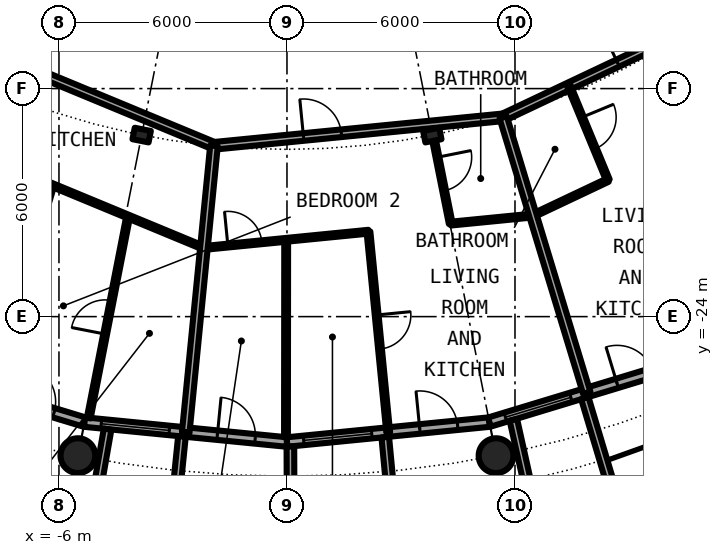
"""IFC4 building model, lengths in metres.
Left out: names, types, materials, properties, quantities, classifications, styles, units other than length and angle.
Written with IfcOpenShell. Run it as: python <this file> out.ifc"""

import sys

from ifc_helpers import new_model, si_unit, direction, frame, frame_2d, origin, origin_2d, place, context, subcontext, project, spatial, rectangle, hollow_circle, i_section, extrude, element, fill, save


model = new_model("IFC4")
c1 = context("Model", 3, precision=1e-05, world=origin(), true_north=direction((0.0, 1.0)))
c2 = subcontext(c1, "Body", "Model", "MODEL_VIEW")
j1 = project(units=[si_unit("LENGTHUNIT", "METRE"), si_unit("PLANEANGLEUNIT", "RADIAN")], contexts=[c1])
p1 = place(None, origin())
s1 = spatial("IfcSite", under=j1, at=p1, CompositionType="ELEMENT")
p2 = place(p1, origin())
s2 = spatial("IfcBuilding", under=s1, at=p2, CompositionType="ELEMENT")
p3 = place(p2, frame((0.0, 0.0, 117.75)))
s3 = spatial("IfcBuildingStorey", under=s2, at=p3, CompositionType="ELEMENT", Elevation=117.75)
for number, where, z_axis, x_axis in (
    (1, (-5.501, -27.658, 0.0), (0.0, 0.0, 1.0), (1.0, 0.0, 0.0)),
    (2, (5.501, -27.658, 0.0), (0.0, 0.0, 1.0), (1.0, 0.0, 0.0)),
):
    element("IfcColumn", number, at=place(p3, frame(where, z_axis=z_axis, x_axis=x_axis)), inside=s3, PredefinedType="COLUMN", context=c2, shape_type="SweptSolid", body=[
        extrude(hollow_circle(Radius=0.457, WallThickness=0.04, at=origin_2d()), origin(), (0.0, 0.0, 1.0), 3.05),
    ])
for number, where, z_axis, x_axis in (
    (3, (-3.824, -19.223, 0.0), (0.0, 0.0, 1.0), (-0.195, -0.981, 0.0)),
    (4, (3.824, -19.223, 0.0), (0.0, 0.0, 1.0), (0.195, -0.981, 0.0)),
):
    element("IfcColumn", number, at=place(p3, frame(where, z_axis=z_axis, x_axis=x_axis)), inside=s3, PredefinedType="COLUMN", context=c2, shape_type="SweptSolid", body=[
        extrude(i_section(OverallWidth=0.307, OverallDepth=0.432, WebThickness=0.021, FlangeThickness=0.04, FilletRadius=0.027, at=origin_2d()), origin(), (0.0, 0.0, 1.0), 3.05),
    ])
p4 = place(p3, frame((-10.447, -25.222, 0.0), z_axis=(0.0, 0.0, 1.0), x_axis=(0.956965678721, -0.290201119486, 0.0)))
e5 = element("IfcWall", 5, at=p4, inside=s3, PredefinedType="SOLIDWALL", context=c2, shape_type="SweptSolid", body=[
    extrude(rectangle(XDim=5.351, YDim=0.25, at=frame_2d((2.676, 0.0))), origin(), (0.0, 0.0, 1.0), 2.7),
])
p5 = place(p4, frame((0.441, 0.0, 0.3)))
e6 = element("IfcOpeningElement", 6, at=p5, cuts=e5, PredefinedType="OPENING", context=c2, shape_type="SweptSolid", body=[
    extrude(rectangle(XDim=1.8, YDim=2.1, at=frame_2d((0.9, 1.05))), frame((0.0, 0.135, 0.0), z_axis=(0.0, -1.0, 0.0), x_axis=(1.0, 0.0, 0.0)), (0.0, 0.0, 1.0), 0.27),
])
p6 = place(p4, frame((3.51, 0.0, 0.0)))
e7 = element("IfcOpeningElement", 7, at=p6, cuts=e5, PredefinedType="OPENING", context=c2, shape_type="SweptSolid", body=[
    extrude(rectangle(XDim=1.0, YDim=2.2, at=frame_2d((0.5, 1.1))), frame((0.0, 0.135, 0.0), z_axis=(0.0, -1.0, 0.0), x_axis=(1.0, 0.0, 0.0)), (0.0, 0.0, 1.0), 0.27),
])
p7 = place(p3, frame((-5.326, -26.775, 0.0), z_axis=(0.0, 0.0, 1.0), x_axis=(0.995173996315, -0.098126026407, 0.0)))
e8 = element("IfcWall", 8, at=p7, inside=s3, PredefinedType="SOLIDWALL", context=c2, shape_type="SweptSolid", body=[
    extrude(rectangle(XDim=5.352, YDim=0.25, at=frame_2d((2.676, 0.0))), origin(), (0.0, 0.0, 1.0), 2.7),
])
p8 = place(p7, frame((0.441, 0.0, 0.3)))
e9 = element("IfcOpeningElement", 9, at=p8, cuts=e8, PredefinedType="OPENING", context=c2, shape_type="SweptSolid", body=[
    extrude(rectangle(XDim=1.8, YDim=2.1, at=frame_2d((0.9, 1.05))), frame((0.0, 0.135, 0.0), z_axis=(0.0, -1.0, 0.0), x_axis=(1.0, 0.0, 0.0)), (0.0, 0.0, 1.0), 0.27),
])
p9 = place(p7, frame((3.51, 0.0, 0.0)))
e10 = element("IfcOpeningElement", 10, at=p9, cuts=e8, PredefinedType="OPENING", context=c2, shape_type="SweptSolid", body=[
    extrude(rectangle(XDim=1.0, YDim=2.2, at=frame_2d((0.5, 1.1))), frame((0.0, 0.135, 0.0), z_axis=(0.0, -1.0, 0.0), x_axis=(1.0, 0.0, 0.0)), (0.0, 0.0, 1.0), 0.27),
])
p10 = place(p3, frame((-4.72, -26.961, -0.03), z_axis=(0.0, 0.0, 1.0), x_axis=(-0.172463232037, -0.98501595601, 0.0)))
e11 = element("IfcWall", 11, at=p10, inside=s3, PredefinedType="SOLIDWALL", context=c2, shape_type="SweptSolid", body=[
    extrude(rectangle(XDim=2.929, YDim=0.2, at=frame_2d((1.464, 0.0))), origin(), (0.0, 0.0, 1.0), 2.73),
])
p11 = place(p3, frame((-2.764, -27.153, -0.03), z_axis=(0.0, 0.0, 1.0), x_axis=(-0.101505487237, -0.994834979311, 0.0)))
e12 = element("IfcWall", 12, at=p11, inside=s3, PredefinedType="SOLIDWALL", context=c2, shape_type="SweptSolid", body=[
    extrude(rectangle(XDim=3.007, YDim=0.2, at=frame_2d((1.503, 0.0))), origin(), (0.0, 0.0, 1.0), 2.73),
])
p12 = place(p3, frame((0.0, -27.3, 0.0), z_axis=(0.0, 0.0, 1.0), x_axis=(0.995173996315, 0.098126026407, 0.0)))
e13 = element("IfcWall", 13, at=p12, inside=s3, PredefinedType="SOLIDWALL", context=c2, shape_type="SweptSolid", body=[
    extrude(rectangle(XDim=5.352, YDim=0.25, at=frame_2d((2.676, 0.0))), origin(), (0.0, 0.0, 1.0), 2.7),
])
p13 = place(p12, frame((0.441, 0.0, 0.3)))
e14 = element("IfcOpeningElement", 14, at=p13, cuts=e13, PredefinedType="OPENING", context=c2, shape_type="SweptSolid", body=[
    extrude(rectangle(XDim=1.8, YDim=2.1, at=frame_2d((0.9, 1.05))), frame((0.0, 0.135, 0.0), z_axis=(0.0, -1.0, 0.0), x_axis=(1.0, 0.0, 0.0)), (0.0, 0.0, 1.0), 0.27),
])
p14 = place(p12, frame((3.51, 0.0, 0.0)))
e15 = element("IfcOpeningElement", 15, at=p14, cuts=e13, PredefinedType="OPENING", context=c2, shape_type="SweptSolid", body=[
    extrude(rectangle(XDim=1.0, YDim=2.2, at=frame_2d((0.5, 1.1))), frame((0.0, 0.135, 0.0), z_axis=(0.0, -1.0, 0.0), x_axis=(1.0, 0.0, 0.0)), (0.0, 0.0, 1.0), 0.27),
])
p15 = place(p3, frame((0.09, -27.417, -0.03), z_axis=(0.0, 0.0, 1.0), x_axis=(0.00347308367, -0.999993968827, 0.0)))
e16 = element("IfcWall", 16, at=p15, inside=s3, PredefinedType="SOLIDWALL", context=c2, shape_type="SweptSolid", body=[
    extrude(rectangle(XDim=2.882, YDim=0.2, at=frame_2d((1.441, 0.0))), origin(), (0.0, 0.0, 1.0), 2.73),
])
p16 = place(p3, frame((2.586, -27.171, -0.03), z_axis=(0.0, 0.0, 1.0), x_axis=(0.094548432284, -0.995520262954, 0.0)))
e17 = element("IfcWall", 17, at=p16, inside=s3, PredefinedType="SOLIDWALL", context=c2, shape_type="SweptSolid", body=[
    extrude(rectangle(XDim=3.006, YDim=0.2, at=frame_2d((1.503, 0.0))), origin(), (0.0, 0.0, 1.0), 2.73),
])
p17 = place(p3, frame((5.326, -26.775, 0.0), z_axis=(0.0, 0.0, 1.0), x_axis=(0.956965678721, 0.290201119486, 0.0)))
e18 = element("IfcWall", 18, at=p17, inside=s3, PredefinedType="SOLIDWALL", context=c2, shape_type="SweptSolid", body=[
    extrude(rectangle(XDim=5.351, YDim=0.25, at=frame_2d((2.676, 0.0))), origin(), (0.0, 0.0, 1.0), 2.7),
])
p18 = place(p17, frame((0.441, 0.0, 0.3)))
e19 = element("IfcOpeningElement", 19, at=p18, cuts=e18, PredefinedType="OPENING", context=c2, shape_type="SweptSolid", body=[
    extrude(rectangle(XDim=1.8, YDim=2.1, at=frame_2d((0.9, 1.05))), frame((0.0, 0.135, 0.0), z_axis=(0.0, -1.0, 0.0), x_axis=(1.0, 0.0, 0.0)), (0.0, 0.0, 1.0), 0.27),
])
p19 = place(p17, frame((3.51, 0.0, 0.0)))
e20 = element("IfcOpeningElement", 20, at=p19, cuts=e18, PredefinedType="OPENING", context=c2, shape_type="SweptSolid", body=[
    extrude(rectangle(XDim=1.0, YDim=2.2, at=frame_2d((0.5, 1.1))), frame((0.0, 0.135, 0.0), z_axis=(0.0, -1.0, 0.0), x_axis=(1.0, 0.0, 0.0)), (0.0, 0.0, 1.0), 0.27),
])
p20 = place(p3, frame((5.957, -26.715, -0.03), z_axis=(0.0, 0.0, 1.0), x_axis=(0.217857287091, -0.975980636315, 0.0)))
e21 = element("IfcWall", 21, at=p20, inside=s3, PredefinedType="SOLIDWALL", context=c2, shape_type="SweptSolid", body=[
    extrude(rectangle(XDim=2.928, YDim=0.2, at=frame_2d((1.464, 0.0))), origin(), (0.0, 0.0, 1.0), 2.73),
])
p21 = place(p3, frame((7.837, -26.144, -0.03), z_axis=(0.0, 0.0, 1.0), x_axis=(0.287064767992, -0.957911174889, 0.0)))
e22 = element("IfcWall", 22, at=p21, inside=s3, PredefinedType="SOLIDWALL", context=c2, shape_type="SweptSolid", body=[
    extrude(rectangle(XDim=3.006, YDim=0.2, at=frame_2d((1.503, 0.0))), origin(), (0.0, 0.0, 1.0), 2.73),
])
p22 = place(p3, frame((6.473, -21.34, 0.0), z_axis=(0.0, 0.0, 1.0), x_axis=(0.903929143338, 0.427682246328, 0.0)))
e23 = element("IfcWall", 23, at=p22, inside=s3, PredefinedType="PARTITIONING", context=c2, shape_type="SweptSolid", body=[
    extrude(rectangle(XDim=2.182, YDim=0.1, at=frame_2d((1.091, 0.0))), origin(), (0.0, 0.0, 1.0), 2.7),
])
p23 = place(p3, frame((-2.193, -22.194, 0.0), z_axis=(0.0, 0.0, 1.0), x_axis=(0.995173152282, 0.098134586035, 0.0)))
e24 = element("IfcWall", 24, at=p23, inside=s3, PredefinedType="PARTITIONING", context=c2, shape_type="SweptSolid", body=[
    extrude(rectangle(XDim=4.361, YDim=0.1, at=frame_2d((2.181, 0.0))), origin(), (0.0, 0.0, 1.0), 2.7),
])
p24 = place(p23, frame((0.641, 0.0, 0.0)))
e25 = element("IfcOpeningElement", 25, at=p24, cuts=e24, PredefinedType="OPENING", context=c2, shape_type="SweptSolid", body=[
    extrude(rectangle(XDim=0.9, YDim=2.3, at=frame_2d((0.45, 1.15))), frame((0.0, 0.06, 0.0), z_axis=(0.0, -1.0, 0.0), x_axis=(1.0, 0.0, 0.0)), (0.0, 0.0, 1.0), 0.12),
])
p25 = place(p3, frame((4.311, -21.553, 0.0), z_axis=(0.0, 0.0, 1.0), x_axis=(0.995195976339, 0.097902853268, 0.0)))
e26 = element("IfcWall", 26, at=p25, inside=s3, PredefinedType="PARTITIONING", context=c2, shape_type="SweptSolid", body=[
    extrude(rectangle(XDim=2.175, YDim=0.1, at=frame_2d((1.087, 0.0))), origin(), (0.0, 0.0, 1.0), 2.7),
])
p26 = place(p3, frame((-8.164, -19.716, 0.0), z_axis=(0.0, 0.0, 1.0), x_axis=(0.92387253274, -0.38270033087, 0.0)))
e27 = element("IfcWall", 27, at=p26, inside=s3, PredefinedType="PARTITIONING", context=c2, shape_type="SweptSolid", body=[
    extrude(rectangle(XDim=6.475, YDim=0.1, at=frame_2d((3.238, 0.0))), origin(), (0.0, 0.0, 1.0), 2.7),
])
p27 = place(p3, frame((5.686, -18.758, 0.0), z_axis=(0.0, 0.0, 1.0), x_axis=(0.903961383505, 0.427614098379, 0.0)))
e28 = element("IfcWall", 28, at=p27, inside=s3, PredefinedType="PARTITIONING", context=c2, shape_type="SweptSolid", body=[
    extrude(rectangle(XDim=5.601, YDim=0.2, at=frame_2d((2.8, 0.0))), origin(), (0.0, 0.0, 1.0), 2.39),
])
p28 = place(p27, frame((3.339, 0.0, 0.0)))
e29 = element("IfcOpeningElement", 29, at=p28, cuts=e28, PredefinedType="OPENING", context=c2, shape_type="SweptSolid", body=[
    extrude(rectangle(XDim=1.0, YDim=2.3, at=frame_2d((0.5, 1.15))), frame((0.0, 0.11, 0.0), z_axis=(0.0, -1.0, 0.0), x_axis=(1.0, 0.0, 0.0)), (0.0, 0.0, 1.0), 0.22),
])
p29 = place(p3, frame((-1.921, -19.506, 0.0), z_axis=(0.0, 0.0, 1.0), x_axis=(0.995172982325, 0.098136309541, 0.0)))
e30 = element("IfcWall", 30, at=p29, inside=s3, PredefinedType="PARTITIONING", context=c2, shape_type="SweptSolid", body=[
    extrude(rectangle(XDim=7.655, YDim=0.2, at=frame_2d((3.827, 0.0))), origin(), (0.0, 0.0, 1.0), 2.39),
])
p30 = place(p29, frame((2.368, 0.0, 0.0)))
e31 = element("IfcOpeningElement", 31, at=p30, cuts=e30, PredefinedType="OPENING", context=c2, shape_type="SweptSolid", body=[
    extrude(rectangle(XDim=1.0, YDim=2.3, at=frame_2d((0.5, 1.15))), frame((0.0, 0.11, 0.0), z_axis=(0.0, -1.0, 0.0), x_axis=(1.0, 0.0, 0.0)), (0.0, 0.0, 1.0), 0.22),
])
p31 = place(p3, frame((-12.434, -15.151, 0.0), z_axis=(0.0, 0.0, 1.0), x_axis=(0.923888467236, -0.382661861319, 0.0)))
e32 = element("IfcWall", 32, at=p31, inside=s3, PredefinedType="PARTITIONING", context=c2, shape_type="SweptSolid", body=[
    extrude(rectangle(XDim=11.381, YDim=0.2, at=frame_2d((5.691, 0.0))), origin(), (0.0, 0.0, 1.0), 2.7),
])
p32 = place(p31, frame((3.292, 0.0, 0.0)))
e33 = element("IfcOpeningElement", 33, at=p32, cuts=e32, PredefinedType="OPENING", context=c2, shape_type="SweptSolid", body=[
    extrude(rectangle(XDim=1.0, YDim=2.3, at=frame_2d((0.5, 1.15))), frame((0.0, 0.11, 0.0), z_axis=(0.0, -1.0, 0.0), x_axis=(1.0, 0.0, 0.0)), (0.0, 0.0, 1.0), 0.22),
])
p33 = place(p3, frame((-7.821, -26.025, 0.0), z_axis=(0.0, 0.0, 1.0), x_axis=(0.287793773423, 0.957692405723, 0.0)))
e34 = element("IfcWall", 34, at=p33, inside=s3, PredefinedType="PARTITIONING", context=c2, shape_type="SweptSolid", body=[
    extrude(rectangle(XDim=5.726, YDim=0.1, at=frame_2d((2.863, 0.0))), origin(), (0.0, 0.0, 1.0), 2.7),
])
p34 = place(p33, frame((2.413, 0.0, 0.0)))
e35 = element("IfcOpeningElement", 35, at=p34, cuts=e34, PredefinedType="OPENING", context=c2, shape_type="SweptSolid", body=[
    extrude(rectangle(XDim=0.9, YDim=2.3, at=frame_2d((0.45, 1.15))), frame((0.0, 0.06, 0.0), z_axis=(0.0, -1.0, 0.0), x_axis=(1.0, 0.0, 0.0)), (0.0, 0.0, 1.0), 0.12),
])
p35 = place(p3, frame((-5.217, -26.67, 0.0), z_axis=(0.0, 0.0, 1.0), x_axis=(0.192109041462, 0.981373586453, 0.0)))
e36 = element("IfcWall", 36, at=p35, inside=s3, PredefinedType="PARTITIONING", context=c2, shape_type="SweptSolid", body=[
    extrude(rectangle(XDim=5.404, YDim=0.1, at=frame_2d((2.702, 0.0))), origin(), (0.0, 0.0, 1.0), 2.7),
])
p36 = place(p35, frame((2.252, 0.0, 0.0)))
e37 = element("IfcOpeningElement", 37, at=p36, cuts=e36, PredefinedType="OPENING", context=c2, shape_type="SweptSolid", body=[
    extrude(rectangle(XDim=0.9, YDim=2.3, at=frame_2d((0.45, 1.15))), frame((0.0, 0.06, 0.0), z_axis=(0.0, -1.0, 0.0), x_axis=(1.0, 0.0, 0.0)), (0.0, 0.0, 1.0), 0.12),
])
p37 = place(p3, frame((-2.664, -27.044, 0.0), z_axis=(0.0, 0.0, 1.0), x_axis=(0.098115395479, 0.995175044487, 0.0)))
e38 = element("IfcWall", 38, at=p37, inside=s3, PredefinedType="PARTITIONING", context=c2, shape_type="SweptSolid", body=[
    extrude(rectangle(XDim=7.574, YDim=0.2, at=frame_2d((3.787, 0.0))), origin(), (0.0, 0.0, 1.0), 2.7),
])
p38 = place(p3, frame((-0.026, -27.175, 0.0), z_axis=(0.0, 0.0, 1.0), x_axis=(0.00093971673, 0.999999558466, 0.0)))
e39 = element("IfcWall", 39, at=p38, inside=s3, PredefinedType="PARTITIONING", context=c2, shape_type="SweptSolid", body=[
    extrude(rectangle(XDim=5.196, YDim=0.1, at=frame_2d((2.598, 0.0))), origin(), (0.0, 0.0, 1.0), 2.7),
])
p39 = place(p3, frame((2.144, -21.766, 0.0), z_axis=(0.0, 0.0, 1.0), x_axis=(0.098054199821, -0.995181075934, 0.0)))
e40 = element("IfcWall", 40, at=p39, inside=s3, PredefinedType="PARTITIONING", context=c2, shape_type="SweptSolid", body=[
    extrude(rectangle(XDim=5.303, YDim=0.1, at=frame_2d((2.652, 0.0))), origin(), (0.0, 0.0, 1.0), 2.7),
])
p40 = place(p39, frame((2.202, 0.0, 0.0)))
e41 = element("IfcOpeningElement", 41, at=p40, cuts=e40, PredefinedType="OPENING", context=c2, shape_type="SweptSolid", body=[
    extrude(rectangle(XDim=0.9, YDim=2.3, at=frame_2d((0.45, 1.15))), frame((0.0, 0.06, 0.0), z_axis=(0.0, -1.0, 0.0), x_axis=(1.0, 0.0, 0.0)), (0.0, 0.0, 1.0), 0.12),
])
p41 = place(p3, frame((3.885, -19.432, 0.0), z_axis=(0.0, 0.0, 1.0), x_axis=(0.196051018784, -0.980593696713, 0.0)))
e42 = element("IfcWall", 42, at=p41, inside=s3, PredefinedType="PARTITIONING", context=c2, shape_type="SweptSolid", body=[
    extrude(rectangle(XDim=2.163, YDim=0.1, at=frame_2d((1.082, 0.0))), origin(), (0.0, 0.0, 1.0), 2.7),
])
p42 = place(p41, frame((0.382, 0.0, 0.0)))
e43 = element("IfcOpeningElement", 43, at=p42, cuts=e42, PredefinedType="OPENING", context=c2, shape_type="SweptSolid", body=[
    extrude(rectangle(XDim=0.9, YDim=2.3, at=frame_2d((0.45, 1.15))), frame((0.0, 0.06, 0.0), z_axis=(0.0, -1.0, 0.0), x_axis=(1.0, 0.0, 0.0)), (0.0, 0.0, 1.0), 0.12),
])
p43 = place(p3, frame((5.689, -18.756, 0.0), z_axis=(0.0, 0.0, 1.0), x_axis=(0.290294523619, -0.956937348815, 0.0)))
e44 = element("IfcWall", 44, at=p43, inside=s3, PredefinedType="PARTITIONING", context=c2, shape_type="SweptSolid", body=[
    extrude(rectangle(XDim=7.575, YDim=0.2, at=frame_2d((3.788, 0.0))), origin(), (0.0, 0.0, 1.0), 2.7),
])
p44 = place(p3, frame((7.423, -17.936, 0.0), z_axis=(0.0, 0.0, 1.0), x_axis=(0.382195876364, -0.924081334132, 0.0)))
e45 = element("IfcWall", 45, at=p44, inside=s3, PredefinedType="PARTITIONING", context=c2, shape_type="SweptSolid", body=[
    extrude(rectangle(XDim=2.674, YDim=0.1, at=frame_2d((1.337, 0.0))), origin(), (0.0, 0.0, 1.0), 2.7),
])
p45 = place(p44, frame((0.887, 0.0, 0.0)))
e46 = element("IfcOpeningElement", 46, at=p45, cuts=e45, PredefinedType="OPENING", context=c2, shape_type="SweptSolid", body=[
    extrude(rectangle(XDim=0.9, YDim=2.3, at=frame_2d((0.45, 1.15))), frame((0.0, 0.06, 0.0), z_axis=(0.0, -1.0, 0.0), x_axis=(1.0, 0.0, 0.0)), (0.0, 0.0, 1.0), 0.12),
])
p46 = place(p6, origin())
e47 = element("IfcDoor", 47, at=p46, inside=s3, OperationType="SINGLE_SWING_LEFT", PredefinedType="DOOR", context=c2, shape_type="SweptSolid", body=[
    extrude(rectangle(XDim=1.0, YDim=2.2, at=frame_2d((0.5, 1.1))), frame((0.0, 0.025, 0.0), z_axis=(0.0, -1.0, 0.0), x_axis=(1.0, 0.0, 0.0)), (0.0, 0.0, 1.0), 0.05),
])
fill(e7, e47)
p47 = place(p8, origin())
e48 = element("IfcWindow", 48, at=p47, inside=s3, PartitioningType="SINGLE_PANEL", PredefinedType="WINDOW", context=c2, shape_type="SweptSolid", body=[
    extrude(rectangle(XDim=1.8, YDim=2.1, at=frame_2d((0.9, 1.05))), frame((0.0, 0.03, 0.0), z_axis=(0.0, -1.0, 0.0), x_axis=(1.0, 0.0, 0.0)), (0.0, 0.0, 1.0), 0.06),
])
fill(e9, e48)
p48 = place(p9, origin())
e49 = element("IfcDoor", 49, at=p48, inside=s3, OperationType="SINGLE_SWING_LEFT", PredefinedType="DOOR", context=c2, shape_type="SweptSolid", body=[
    extrude(rectangle(XDim=1.0, YDim=2.2, at=frame_2d((0.5, 1.1))), frame((0.0, 0.025, 0.0), z_axis=(0.0, -1.0, 0.0), x_axis=(1.0, 0.0, 0.0)), (0.0, 0.0, 1.0), 0.05),
])
fill(e10, e49)
p49 = place(p13, origin())
e50 = element("IfcWindow", 50, at=p49, inside=s3, PartitioningType="SINGLE_PANEL", PredefinedType="WINDOW", context=c2, shape_type="SweptSolid", body=[
    extrude(rectangle(XDim=1.8, YDim=2.1, at=frame_2d((0.9, 1.05))), frame((0.0, 0.03, 0.0), z_axis=(0.0, -1.0, 0.0), x_axis=(1.0, 0.0, 0.0)), (0.0, 0.0, 1.0), 0.06),
])
fill(e14, e50)
p50 = place(p14, origin())
e51 = element("IfcDoor", 51, at=p50, inside=s3, OperationType="SINGLE_SWING_LEFT", PredefinedType="DOOR", context=c2, shape_type="SweptSolid", body=[
    extrude(rectangle(XDim=1.0, YDim=2.2, at=frame_2d((0.5, 1.1))), frame((0.0, 0.025, 0.0), z_axis=(0.0, -1.0, 0.0), x_axis=(1.0, 0.0, 0.0)), (0.0, 0.0, 1.0), 0.05),
])
fill(e15, e51)
p51 = place(p18, origin())
e52 = element("IfcWindow", 52, at=p51, inside=s3, PartitioningType="SINGLE_PANEL", PredefinedType="WINDOW", context=c2, shape_type="SweptSolid", body=[
    extrude(rectangle(XDim=1.8, YDim=2.1, at=frame_2d((0.9, 1.05))), frame((0.0, 0.03, 0.0), z_axis=(0.0, -1.0, 0.0), x_axis=(1.0, 0.0, 0.0)), (0.0, 0.0, 1.0), 0.06),
])
fill(e19, e52)
p52 = place(p19, origin())
e53 = element("IfcDoor", 53, at=p52, inside=s3, OperationType="SINGLE_SWING_LEFT", PredefinedType="DOOR", context=c2, shape_type="SweptSolid", body=[
    extrude(rectangle(XDim=1.0, YDim=2.2, at=frame_2d((0.5, 1.1))), frame((0.0, 0.025, 0.0), z_axis=(0.0, -1.0, 0.0), x_axis=(1.0, 0.0, 0.0)), (0.0, 0.0, 1.0), 0.05),
])
fill(e20, e53)
p53 = place(p36, origin())
e54 = element("IfcDoor", 54, at=p53, inside=s3, OperationType="SINGLE_SWING_RIGHT", PredefinedType="DOOR", context=c2, shape_type="SweptSolid", body=[
    extrude(rectangle(XDim=0.9, YDim=2.3, at=frame_2d((0.45, 1.15))), frame((0.0, 0.025, 0.0), z_axis=(0.0, -1.0, 0.0), x_axis=(1.0, 0.0, 0.0)), (0.0, 0.0, 1.0), 0.05),
])
fill(e37, e54)
p54 = place(p30, origin())
e55 = element("IfcDoor", 55, at=p54, inside=s3, OperationType="SINGLE_SWING_LEFT", PredefinedType="DOOR", context=c2, shape_type="SweptSolid", body=[
    extrude(rectangle(XDim=1.0, YDim=2.3, at=frame_2d((0.5, 1.15))), frame((0.0, 0.025, 0.0), z_axis=(0.0, -1.0, 0.0), x_axis=(1.0, 0.0, 0.0)), (0.0, 0.0, 1.0), 0.05),
])
fill(e31, e55)
p55 = place(p42, origin())
e56 = element("IfcDoor", 56, at=p55, inside=s3, OperationType="SINGLE_SWING_LEFT", PredefinedType="DOOR", context=c2, shape_type="SweptSolid", body=[
    extrude(rectangle(XDim=0.9, YDim=2.3, at=frame_2d((0.45, 1.15))), frame((0.0, 0.025, 0.0), z_axis=(0.0, -1.0, 0.0), x_axis=(1.0, 0.0, 0.0)), (0.0, 0.0, 1.0), 0.05),
])
fill(e43, e56)
p56 = place(p40, origin())
e57 = element("IfcDoor", 57, at=p56, inside=s3, OperationType="SINGLE_SWING_RIGHT", PredefinedType="DOOR", context=c2, shape_type="SweptSolid", body=[
    extrude(rectangle(XDim=0.9, YDim=2.3, at=frame_2d((0.45, 1.15))), frame((0.0, 0.025, 0.0), z_axis=(0.0, -1.0, 0.0), x_axis=(1.0, 0.0, 0.0)), (0.0, 0.0, 1.0), 0.05),
])
fill(e41, e57)
p57 = place(p24, origin())
e58 = element("IfcDoor", 58, at=p57, inside=s3, OperationType="SINGLE_SWING_LEFT", PredefinedType="DOOR", context=c2, shape_type="SweptSolid", body=[
    extrude(rectangle(XDim=0.9, YDim=2.3, at=frame_2d((0.45, 1.15))), frame((0.0, 0.025, 0.0), z_axis=(0.0, -1.0, 0.0), x_axis=(1.0, 0.0, 0.0)), (0.0, 0.0, 1.0), 0.05),
])
fill(e25, e58)
p58 = place(p28, origin())
e59 = element("IfcDoor", 59, at=p58, inside=s3, OperationType="SINGLE_SWING_RIGHT", PredefinedType="DOOR", context=c2, shape_type="SweptSolid", body=[
    extrude(rectangle(XDim=1.0, YDim=2.3, at=frame_2d((0.5, 1.15))), frame((0.0, 0.025, 0.0), z_axis=(0.0, -1.0, 0.0), x_axis=(1.0, 0.0, 0.0)), (0.0, 0.0, 1.0), 0.05),
])
fill(e29, e59)
p59 = place(p45, origin())
e60 = element("IfcDoor", 60, at=p59, inside=s3, OperationType="SINGLE_SWING_RIGHT", PredefinedType="DOOR", context=c2, shape_type="SweptSolid", body=[
    extrude(rectangle(XDim=0.9, YDim=2.3, at=frame_2d((0.45, 1.15))), frame((0.0, 0.025, 0.0), z_axis=(0.0, -1.0, 0.0), x_axis=(1.0, 0.0, 0.0)), (0.0, 0.0, 1.0), 0.05),
])
fill(e46, e60)
save(model, sys.argv[1])
